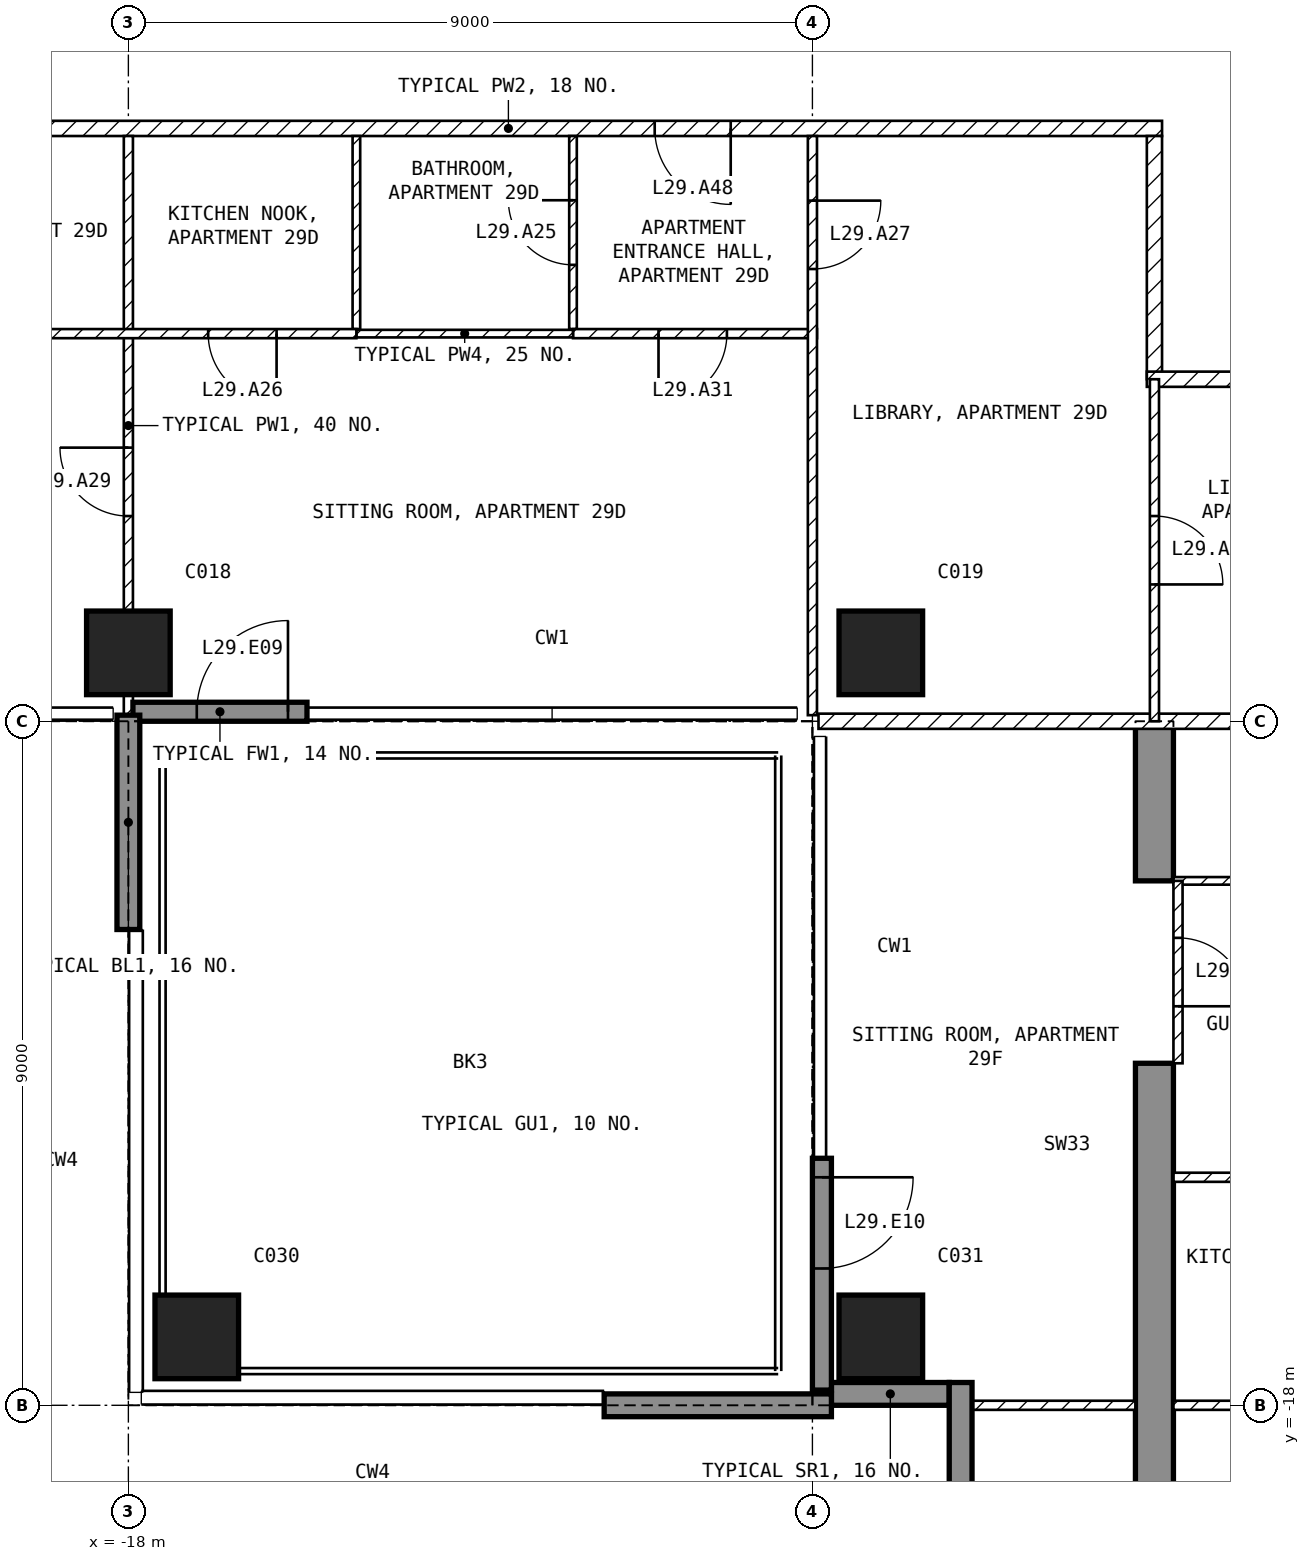
"""IFC4 building model, lengths in metres.
Left out: names, types, materials, properties, quantities, classifications, styles, units other than length and angle.
Written with IfcOpenShell. Run it as: python <this file> out.ifc"""

import sys

from ifc_helpers import new_model, si_unit, direction, frame, frame_2d, origin, origin_2d, place, context, subcontext, project, spatial, polyline, rectangle, outline, extrude, element, fill, save


model = new_model("IFC4")
c1 = context("Model", 3, precision=1e-05, world=origin(), true_north=direction((0.0, 1.0)))
c2 = subcontext(c1, "Body", "Model", "MODEL_VIEW")
j1 = project(units=[si_unit("LENGTHUNIT", "METRE"), si_unit("PLANEANGLEUNIT", "RADIAN")], contexts=[c1])
p1 = place(None, origin())
s1 = spatial("IfcSite", under=j1, at=p1, CompositionType="ELEMENT")
p2 = place(p1, origin())
s2 = spatial("IfcBuilding", under=s1, at=p2, CompositionType="ELEMENT")
p3 = place(p2, frame((0.0, 0.0, 123.4)))
s3 = spatial("IfcBuildingStorey", under=s2, at=p3, CompositionType="ELEMENT", Elevation=123.4)
for number, where, z_axis, x_axis in (
    (1, (-18.0, -8.1, -0.25), (0.0, 0.0, 1.0), (1.0, 0.0, 0.0)),
    (2, (-8.1, -17.1, -0.25), (0.0, 0.0, 1.0), (1.0, 0.0, 0.0)),
    (3, (-8.1, -8.1, -0.25), (0.0, 0.0, 1.0), (1.0, 0.0, 0.0)),
    (4, (-17.1, -17.1, -0.25), (0.0, 0.0, 1.0), (1.0, 0.0, 0.0)),
):
    element("IfcColumn", number, at=place(p3, frame(where, z_axis=z_axis, x_axis=x_axis)), inside=s3, PredefinedType="COLUMN", context=c2, shape_type="SweptSolid", body=[
        extrude(rectangle(XDim=1.1, YDim=1.1, at=origin_2d()), origin(), (0.0, 0.0, 1.0), 3.5),
    ])
p4 = place(p3, frame((-4.75, -20.15, -0.25), z_axis=(1.0, 0.0, 0.0), x_axis=(0.0, 1.0, 0.0)))
e5 = element("IfcWall", 5, at=p4, inside=s3, PredefinedType="SHEAR", context=c2, shape_type="SweptSolid", body=[
    extrude(outline(polyline([(0.0, 0.0), (6.65, 0.0), (6.65, 2.65), (9.05, 2.65), (9.05, 0.0), (11.15, 0.0), (11.15, 3.5), (0.0, 3.5), (0.0, 0.0)])), origin(), (0.0, 0.0, 1.0), 0.5),
])
p5 = place(p3, frame((-17.94, -8.875, 0.0), z_axis=(0.0, 0.0, 1.0), x_axis=(1.0, 0.0, 0.0)))
e6 = element("IfcWall", 6, at=p5, inside=s3, PredefinedType="SOLIDWALL", context=c2, shape_type="SweptSolid", body=[
    extrude(rectangle(XDim=2.29, YDim=0.25, at=frame_2d((1.145, 0.0))), origin(), (0.0, 0.0, 1.0), 3.25),
])
p6 = place(p5, frame((0.84, 0.0, 0.0)))
e7 = element("IfcOpeningElement", 7, at=p6, cuts=e6, PredefinedType="OPENING", context=c2, shape_type="SweptSolid", body=[
    extrude(rectangle(XDim=1.2, YDim=2.4, at=frame_2d((0.6, 1.2))), frame((0.0, 0.135, 0.0), z_axis=(0.0, -1.0, 0.0), x_axis=(1.0, 0.0, 0.0)), (0.0, 0.0, 1.0), 0.27),
])
p7 = place(p3, frame((-8.875, -14.75, 0.0), z_axis=(0.0, 0.0, 1.0), x_axis=(0.0, -1.0, 0.0)))
e8 = element("IfcWall", 8, at=p7, inside=s3, PredefinedType="SOLIDWALL", context=c2, shape_type="SweptSolid", body=[
    extrude(rectangle(XDim=3.05, YDim=0.25, at=frame_2d((1.525, 0.0))), origin(), (0.0, 0.0, 1.0), 3.25),
])
p8 = place(p7, frame((0.25, 0.0, 0.0)))
e9 = element("IfcOpeningElement", 9, at=p8, cuts=e8, PredefinedType="OPENING", context=c2, shape_type="SweptSolid", body=[
    extrude(rectangle(XDim=1.2, YDim=2.4, at=frame_2d((0.6, 1.2))), frame((0.0, 0.135, 0.0), z_axis=(0.0, -1.0, 0.0), x_axis=(1.0, 0.0, 0.0)), (0.0, 0.0, 1.0), 0.27),
])
p9 = place(p3, frame((-8.75, -17.85, 0.0), z_axis=(0.0, 0.0, 1.0), x_axis=(1.0, 0.0, 0.0)))
e10 = element("IfcWall", 10, at=p9, inside=s3, PredefinedType="SOLIDWALL", context=c2, shape_type="SweptSolid", body=[
    extrude(rectangle(XDim=1.55, YDim=0.3, at=frame_2d((0.775, 0.0))), origin(), (0.0, 0.0, 1.0), 3.25),
])
p10 = place(p3, frame((-7.05, -17.7, 0.0), z_axis=(0.0, 0.0, 1.0), x_axis=(0.0, -1.0, 0.0)))
e11 = element("IfcWall", 11, at=p10, inside=s3, PredefinedType="SOLIDWALL", context=c2, shape_type="SweptSolid", body=[
    extrude(rectangle(XDim=1.8, YDim=0.3, at=frame_2d((0.9, 0.0))), origin(), (0.0, 0.0, 1.0), 3.25),
])
p11 = place(p3, frame((-18.0, -8.92, 0.0), z_axis=(0.0, 0.0, 1.0), x_axis=(0.0, -1.0, 0.0)))
e12 = element("IfcWall", 12, at=p11, inside=s3, PredefinedType="SOLIDWALL", context=c2, shape_type="SweptSolid", body=[
    extrude(rectangle(XDim=2.82, YDim=0.3, at=frame_2d((1.41, 0.0))), origin(), (0.0, 0.0, 1.0), 3.25),
])
p12 = place(p3, frame((-8.75, -18.0, 0.0), z_axis=(0.0, 0.0, 1.0), x_axis=(-1.0, 0.0, 0.0)))
e13 = element("IfcWall", 13, at=p12, inside=s3, PredefinedType="SOLIDWALL", context=c2, shape_type="SweptSolid", body=[
    extrude(rectangle(XDim=2.99, YDim=0.3, at=frame_2d((1.495, 0.0))), origin(), (0.0, 0.0, 1.0), 3.25),
])
p13 = place(p3, frame((-4.4, -1.2, 0.0), z_axis=(0.0, 0.0, 1.0), x_axis=(-1.0, 0.0, 0.0)))
e14 = element("IfcWall", 14, at=p13, inside=s3, PredefinedType="PARTITIONING", context=c2, shape_type="SweptSolid", body=[
    extrude(rectangle(XDim=17.2, YDim=0.2, at=frame_2d((8.6, 0.0))), origin(), (0.0, 0.0, 1.0), 3.25),
])
p14 = place(p13, frame((5.675, 0.0, 0.0)))
e15 = element("IfcOpeningElement", 15, at=p14, cuts=e14, PredefinedType="OPENING", context=c2, shape_type="SweptSolid", body=[
    extrude(rectangle(XDim=1.0, YDim=2.1, at=frame_2d((0.5, 1.05))), frame((0.0, 0.11, 0.0), z_axis=(0.0, -1.0, 0.0), x_axis=(1.0, 0.0, 0.0)), (0.0, 0.0, 1.0), 0.22),
])
p15 = place(p3, frame((-4.5, -4.5, 0.0), z_axis=(0.0, 0.0, 1.0), x_axis=(0.0, 1.0, 0.0)))
e16 = element("IfcWall", 16, at=p15, inside=s3, PredefinedType="PARTITIONING", context=c2, shape_type="SweptSolid", body=[
    extrude(rectangle(XDim=3.2, YDim=0.2, at=frame_2d((1.6, 0.0))), origin(), (0.0, 0.0, 1.0), 3.25),
])
p16 = place(p3, frame((-1.1, -4.5, 0.0), z_axis=(0.0, 0.0, 1.0), x_axis=(-1.0, 0.0, 0.0)))
e17 = element("IfcWall", 17, at=p16, inside=s3, PredefinedType="PARTITIONING", context=c2, shape_type="SweptSolid", body=[
    extrude(rectangle(XDim=3.5, YDim=0.2, at=frame_2d((1.75, 0.0))), origin(), (0.0, 0.0, 1.0), 3.25),
])
p17 = place(p3, frame((8.92, -9.0, 0.0), z_axis=(0.0, 0.0, 1.0), x_axis=(-1.0, 0.0, 0.0)))
e18 = element("IfcWall", 18, at=p17, inside=s3, PredefinedType="PARTITIONING", context=c2, shape_type="SweptSolid", body=[
    extrude(rectangle(XDim=17.84, YDim=0.2, at=frame_2d((8.92, 0.0))), origin(), (0.0, 0.0, 1.0), 3.25),
])
p18 = place(p17, frame((8.42, 0.0, 0.0)))
e19 = element("IfcOpeningElement", 19, at=p18, cuts=e18, PredefinedType="OPENING", context=c2, shape_type="SweptSolid", body=[
    extrude(rectangle(XDim=1.0, YDim=2.1, at=frame_2d((0.5, 1.05))), frame((0.0, 0.11, 0.0), z_axis=(0.0, -1.0, 0.0), x_axis=(1.0, 0.0, 0.0)), (0.0, 0.0, 1.0), 0.22),
])
p19 = place(p3, frame((-12.15, -3.84, 0.0), z_axis=(0.0, 0.0, 1.0), x_axis=(0.0, 1.0, 0.0)))
e20 = element("IfcWall", 20, at=p19, inside=s3, PredefinedType="PARTITIONING", context=c2, shape_type="SweptSolid", body=[
    extrude(rectangle(XDim=2.54, YDim=0.1, at=frame_2d((1.27, 0.0))), origin(), (0.0, 0.0, 1.0), 3.25),
])
p20 = place(p19, frame((0.845, 0.0, 0.0)))
e21 = element("IfcOpeningElement", 21, at=p20, cuts=e20, PredefinedType="OPENING", context=c2, shape_type="SweptSolid", body=[
    extrude(rectangle(XDim=0.85, YDim=2.1, at=frame_2d((0.425, 1.05))), frame((0.0, 0.06, 0.0), z_axis=(0.0, -1.0, 0.0), x_axis=(1.0, 0.0, 0.0)), (0.0, 0.0, 1.0), 0.12),
])
p21 = place(p3, frame((-8.94, -3.9, 0.0), z_axis=(0.0, 0.0, 1.0), x_axis=(-1.0, 0.0, 0.0)))
e22 = element("IfcWall", 22, at=p21, inside=s3, PredefinedType="PARTITIONING", context=c2, shape_type="SweptSolid", body=[
    extrude(rectangle(XDim=3.21, YDim=0.12, at=frame_2d((1.605, 0.0))), origin(), (0.0, 0.0, 1.0), 3.25),
])
p22 = place(p21, frame((1.185, 0.0, 0.0)))
e23 = element("IfcOpeningElement", 23, at=p22, cuts=e22, PredefinedType="OPENING", context=c2, shape_type="SweptSolid", body=[
    extrude(rectangle(XDim=0.9, YDim=2.1, at=frame_2d((0.45, 1.05))), frame((0.0, 0.07, 0.0), z_axis=(0.0, -1.0, 0.0), x_axis=(1.0, 0.0, 0.0)), (0.0, 0.0, 1.0), 0.14),
])
p23 = place(p3, frame((-9.0, -1.3, 0.0), z_axis=(0.0, 0.0, 1.0), x_axis=(0.0, -1.0, 0.0)))
e24 = element("IfcWall", 24, at=p23, inside=s3, PredefinedType="PARTITIONING", context=c2, shape_type="SweptSolid", body=[
    extrude(rectangle(XDim=7.62, YDim=0.12, at=frame_2d((3.81, 0.0))), origin(), (0.0, 0.0, 1.0), 3.25),
])
p24 = place(p23, frame((0.85, 0.0, 0.0)))
e25 = element("IfcOpeningElement", 25, at=p24, cuts=e24, PredefinedType="OPENING", context=c2, shape_type="SweptSolid", body=[
    extrude(rectangle(XDim=0.9, YDim=2.1, at=frame_2d((0.45, 1.05))), frame((0.0, 0.07, 0.0), z_axis=(0.0, -1.0, 0.0), x_axis=(1.0, 0.0, 0.0)), (0.0, 0.0, 1.0), 0.14),
])
p25 = place(p3, frame((-15.0, -3.84, 0.0), z_axis=(0.0, 0.0, 1.0), x_axis=(0.0, 1.0, 0.0)))
e26 = element("IfcWall", 26, at=p25, inside=s3, PredefinedType="PARTITIONING", context=c2, shape_type="SweptSolid", body=[
    extrude(rectangle(XDim=2.54, YDim=0.1, at=frame_2d((1.27, 0.0))), origin(), (0.0, 0.0, 1.0), 3.25),
])
p26 = place(p3, frame((-12.15, -3.9, 0.0), z_axis=(0.0, 0.0, 1.0), x_axis=(-1.0, 0.0, 0.0)))
e27 = element("IfcWall", 27, at=p26, inside=s3, PredefinedType="PARTITIONING", context=c2, shape_type="SweptSolid", body=[
    extrude(rectangle(XDim=2.85, YDim=0.1, at=frame_2d((1.425, 0.0))), origin(), (0.0, 0.0, 1.0), 3.25),
])
p27 = place(p3, frame((-18.0, -8.92, 0.0), z_axis=(0.0, 0.0, 1.0), x_axis=(0.0, 1.0, 0.0)))
e28 = element("IfcWall", 28, at=p27, inside=s3, PredefinedType="PARTITIONING", context=c2, shape_type="SweptSolid", body=[
    extrude(rectangle(XDim=7.62, YDim=0.12, at=frame_2d((3.81, 0.0))), origin(), (0.0, 0.0, 1.0), 2.414),
])
p28 = place(p27, frame((2.62, 0.0, 0.0)))
e29 = element("IfcOpeningElement", 29, at=p28, cuts=e28, PredefinedType="OPENING", context=c2, shape_type="SweptSolid", body=[
    extrude(rectangle(XDim=0.9, YDim=2.1, at=frame_2d((0.45, 1.05))), frame((0.0, 0.07, 0.0), z_axis=(0.0, -1.0, 0.0), x_axis=(1.0, 0.0, 0.0)), (0.0, 0.0, 1.0), 0.14),
])
p29 = place(p3, frame((-15.0, -3.9, 0.0), z_axis=(0.0, 0.0, 1.0), x_axis=(-1.0, 0.0, 0.0)))
e30 = element("IfcWall", 30, at=p29, inside=s3, PredefinedType="PARTITIONING", context=c2, shape_type="SweptSolid", body=[
    extrude(rectangle(XDim=6.6, YDim=0.12, at=frame_2d((3.3, 0.0))), origin(), (0.0, 0.0, 1.0), 3.25),
])
p30 = place(p29, frame((1.05, 0.0, 0.0)))
e31 = element("IfcOpeningElement", 31, at=p30, cuts=e30, PredefinedType="OPENING", context=c2, shape_type="SweptSolid", body=[
    extrude(rectangle(XDim=0.9, YDim=2.1, at=frame_2d((0.45, 1.05))), frame((0.0, 0.07, 0.0), z_axis=(0.0, -1.0, 0.0), x_axis=(1.0, 0.0, 0.0)), (0.0, 0.0, 1.0), 0.14),
])
p31 = place(p29, frame((4.35, 0.0, 0.0)))
e32 = element("IfcOpeningElement", 32, at=p31, cuts=e30, PredefinedType="OPENING", context=c2, shape_type="SweptSolid", body=[
    extrude(rectangle(XDim=0.9, YDim=2.1, at=frame_2d((0.45, 1.05))), frame((0.0, 0.07, 0.0), z_axis=(0.0, -1.0, 0.0), x_axis=(1.0, 0.0, 0.0)), (0.0, 0.0, 1.0), 0.14),
])
p32 = place(p3, frame((-4.5, -4.5, 0.0), z_axis=(0.0, 0.0, 1.0), x_axis=(0.0, -1.0, 0.0)))
e33 = element("IfcWall", 33, at=p32, inside=s3, PredefinedType="PARTITIONING", context=c2, shape_type="SweptSolid", body=[
    extrude(rectangle(XDim=4.5, YDim=0.12, at=frame_2d((2.25, 0.0))), origin(), (0.0, 0.0, 1.0), 3.25),
])
p33 = place(p32, frame((1.8, 0.0, 0.0)))
e34 = element("IfcOpeningElement", 34, at=p33, cuts=e33, PredefinedType="OPENING", context=c2, shape_type="SweptSolid", body=[
    extrude(rectangle(XDim=0.9, YDim=2.1, at=frame_2d((0.45, 1.05))), frame((0.0, 0.07, 0.0), z_axis=(0.0, -1.0, 0.0), x_axis=(1.0, 0.0, 0.0)), (0.0, 0.0, 1.0), 0.14),
])
p34 = place(p3, frame((-2.1, -11.1, 0.0), z_axis=(0.0, 0.0, 1.0), x_axis=(-1.0, 0.0, 0.0)))
e35 = element("IfcWall", 35, at=p34, inside=s3, PredefinedType="PARTITIONING", context=c2, shape_type="SweptSolid", body=[
    extrude(rectangle(XDim=2.15, YDim=0.1, at=frame_2d((1.075, 0.0))), origin(), (0.0, 0.0, 1.0), 3.25),
])
p35 = place(p3, frame((-0.44, -15.0, 0.0), z_axis=(0.0, 0.0, 1.0), x_axis=(-1.0, 0.0, 0.0)))
e36 = element("IfcWall", 36, at=p35, inside=s3, PredefinedType="PARTITIONING", context=c2, shape_type="SweptSolid", body=[
    extrude(rectangle(XDim=3.81, YDim=0.12, at=frame_2d((1.905, 0.0))), origin(), (0.0, 0.0, 1.0), 3.25),
])
p36 = place(p3, frame((4.25, -18.0, 0.0), z_axis=(0.0, 0.0, 1.0), x_axis=(-1.0, 0.0, 0.0)))
e37 = element("IfcWall", 37, at=p36, inside=s3, PredefinedType="PARTITIONING", context=c2, shape_type="SweptSolid", body=[
    extrude(rectangle(XDim=8.5, YDim=0.12, at=frame_2d((4.25, 0.0))), origin(), (0.0, 0.0, 1.0), 3.25),
])
p37 = place(p36, frame((1.925, 0.0, 0.0)))
e38 = element("IfcOpeningElement", 38, at=p37, cuts=e37, PredefinedType="OPENING", context=c2, shape_type="SweptSolid", body=[
    extrude(rectangle(XDim=0.9, YDim=2.1, at=frame_2d((0.45, 1.05))), frame((0.0, 0.07, 0.0), z_axis=(0.0, -1.0, 0.0), x_axis=(1.0, 0.0, 0.0)), (0.0, 0.0, 1.0), 0.14),
])
p38 = place(p3, frame((-4.75, -18.0, 0.0), z_axis=(0.0, 0.0, 1.0), x_axis=(-1.0, 0.0, 0.0)))
e39 = element("IfcWall", 39, at=p38, inside=s3, PredefinedType="PARTITIONING", context=c2, shape_type="SweptSolid", body=[
    extrude(rectangle(XDim=2.37, YDim=0.12, at=frame_2d((1.185, 0.0))), origin(), (0.0, 0.0, 1.0), 3.25),
])
p39 = place(p3, frame((-4.19, -11.1, 0.0), z_axis=(0.0, 0.0, 1.0), x_axis=(0.0, -1.0, 0.0)))
e40 = element("IfcWall", 40, at=p39, inside=s3, PredefinedType="PARTITIONING", context=c2, shape_type="SweptSolid", body=[
    extrude(rectangle(XDim=2.4, YDim=0.12, at=frame_2d((1.2, 0.0))), origin(), (0.0, 0.0, 1.0), 2.4),
])
p40 = place(p39, frame((0.75, 0.0, 0.0)))
e41 = element("IfcOpeningElement", 41, at=p40, cuts=e40, PredefinedType="OPENING", context=c2, shape_type="SweptSolid", body=[
    extrude(rectangle(XDim=0.9, YDim=2.1, at=frame_2d((0.45, 1.05))), frame((0.0, 0.07, 0.0), z_axis=(0.0, -1.0, 0.0), x_axis=(1.0, 0.0, 0.0)), (0.0, 0.0, 1.0), 0.14),
])
p41 = place(p6, origin())
e42 = element("IfcDoor", 42, at=p41, inside=s3, OperationType="SINGLE_SWING_RIGHT", PredefinedType="DOOR", context=c2, shape_type="SweptSolid", body=[
    extrude(rectangle(XDim=1.2, YDim=2.4, at=frame_2d((0.6, 1.2))), frame((0.0, 0.025, 0.0), z_axis=(0.0, -1.0, 0.0), x_axis=(1.0, 0.0, 0.0)), (0.0, 0.0, 1.0), 0.05),
])
fill(e7, e42)
p42 = place(p8, origin())
e43 = element("IfcDoor", 43, at=p42, inside=s3, OperationType="SINGLE_SWING_LEFT", PredefinedType="DOOR", context=c2, shape_type="SweptSolid", body=[
    extrude(rectangle(XDim=1.2, YDim=2.4, at=frame_2d((0.6, 1.2))), frame((0.0, 0.025, 0.0), z_axis=(0.0, -1.0, 0.0), x_axis=(1.0, 0.0, 0.0)), (0.0, 0.0, 1.0), 0.05),
])
fill(e9, e43)
p43 = place(p20, origin())
e44 = element("IfcDoor", 44, at=p43, inside=s3, OperationType="SINGLE_SWING_RIGHT", PredefinedType="DOOR", context=c2, shape_type="SweptSolid", body=[
    extrude(rectangle(XDim=0.85, YDim=2.1, at=frame_2d((0.425, 1.05))), frame((0.0, 0.025, 0.0), z_axis=(0.0, -1.0, 0.0), x_axis=(1.0, 0.0, 0.0)), (0.0, 0.0, 1.0), 0.05),
])
fill(e21, e44)
p44 = place(p30, origin())
e45 = element("IfcDoor", 45, at=p44, inside=s3, OperationType="SINGLE_SWING_LEFT", PredefinedType="DOOR", context=c2, shape_type="SweptSolid", body=[
    extrude(rectangle(XDim=0.9, YDim=2.1, at=frame_2d((0.45, 1.05))), frame((0.0, 0.025, 0.0), z_axis=(0.0, -1.0, 0.0), x_axis=(1.0, 0.0, 0.0)), (0.0, 0.0, 1.0), 0.05),
])
fill(e31, e45)
p45 = place(p24, origin())
e46 = element("IfcDoor", 46, at=p45, inside=s3, OperationType="SINGLE_SWING_LEFT", PredefinedType="DOOR", context=c2, shape_type="SweptSolid", body=[
    extrude(rectangle(XDim=0.9, YDim=2.1, at=frame_2d((0.45, 1.05))), frame((0.0, 0.025, 0.0), z_axis=(0.0, -1.0, 0.0), x_axis=(1.0, 0.0, 0.0)), (0.0, 0.0, 1.0), 0.05),
])
fill(e25, e46)
p46 = place(p33, origin())
e47 = element("IfcDoor", 47, at=p46, inside=s3, OperationType="SINGLE_SWING_RIGHT", PredefinedType="DOOR", context=c2, shape_type="SweptSolid", body=[
    extrude(rectangle(XDim=0.9, YDim=2.1, at=frame_2d((0.45, 1.05))), frame((0.0, 0.025, 0.0), z_axis=(0.0, -1.0, 0.0), x_axis=(1.0, 0.0, 0.0)), (0.0, 0.0, 1.0), 0.05),
])
fill(e34, e47)
p47 = place(p28, origin())
e48 = element("IfcDoor", 48, at=p47, inside=s3, OperationType="SINGLE_SWING_RIGHT", PredefinedType="DOOR", context=c2, shape_type="SweptSolid", body=[
    extrude(rectangle(XDim=0.9, YDim=2.1, at=frame_2d((0.45, 1.05))), frame((0.0, 0.025, 0.0), z_axis=(0.0, -1.0, 0.0), x_axis=(1.0, 0.0, 0.0)), (0.0, 0.0, 1.0), 0.05),
])
fill(e29, e48)
p48 = place(p22, origin())
e49 = element("IfcDoor", 49, at=p48, inside=s3, OperationType="SINGLE_SWING_RIGHT", PredefinedType="DOOR", context=c2, shape_type="SweptSolid", body=[
    extrude(rectangle(XDim=0.9, YDim=2.1, at=frame_2d((0.45, 1.05))), frame((0.0, 0.025, 0.0), z_axis=(0.0, -1.0, 0.0), x_axis=(1.0, 0.0, 0.0)), (0.0, 0.0, 1.0), 0.05),
])
fill(e23, e49)
p49 = place(p14, origin())
e50 = element("IfcDoor", 50, at=p49, inside=s3, OperationType="SINGLE_SWING_LEFT", PredefinedType="DOOR", context=c2, shape_type="SweptSolid", body=[
    extrude(rectangle(XDim=1.0, YDim=2.1, at=frame_2d((0.5, 1.05))), frame((0.0, 0.025, 0.0), z_axis=(0.0, -1.0, 0.0), x_axis=(1.0, 0.0, 0.0)), (0.0, 0.0, 1.0), 0.05),
])
fill(e15, e50)
p50 = place(p40, origin())
e51 = element("IfcDoor", 51, at=p50, inside=s3, OperationType="SINGLE_SWING_RIGHT", PredefinedType="DOOR", context=c2, shape_type="SweptSolid", body=[
    extrude(rectangle(XDim=0.9, YDim=2.1, at=frame_2d((0.45, 1.05))), frame((0.0, 0.025, 0.0), z_axis=(0.0, -1.0, 0.0), x_axis=(1.0, 0.0, 0.0)), (0.0, 0.0, 1.0), 0.05),
])
fill(e41, e51)
save(model, sys.argv[1])
